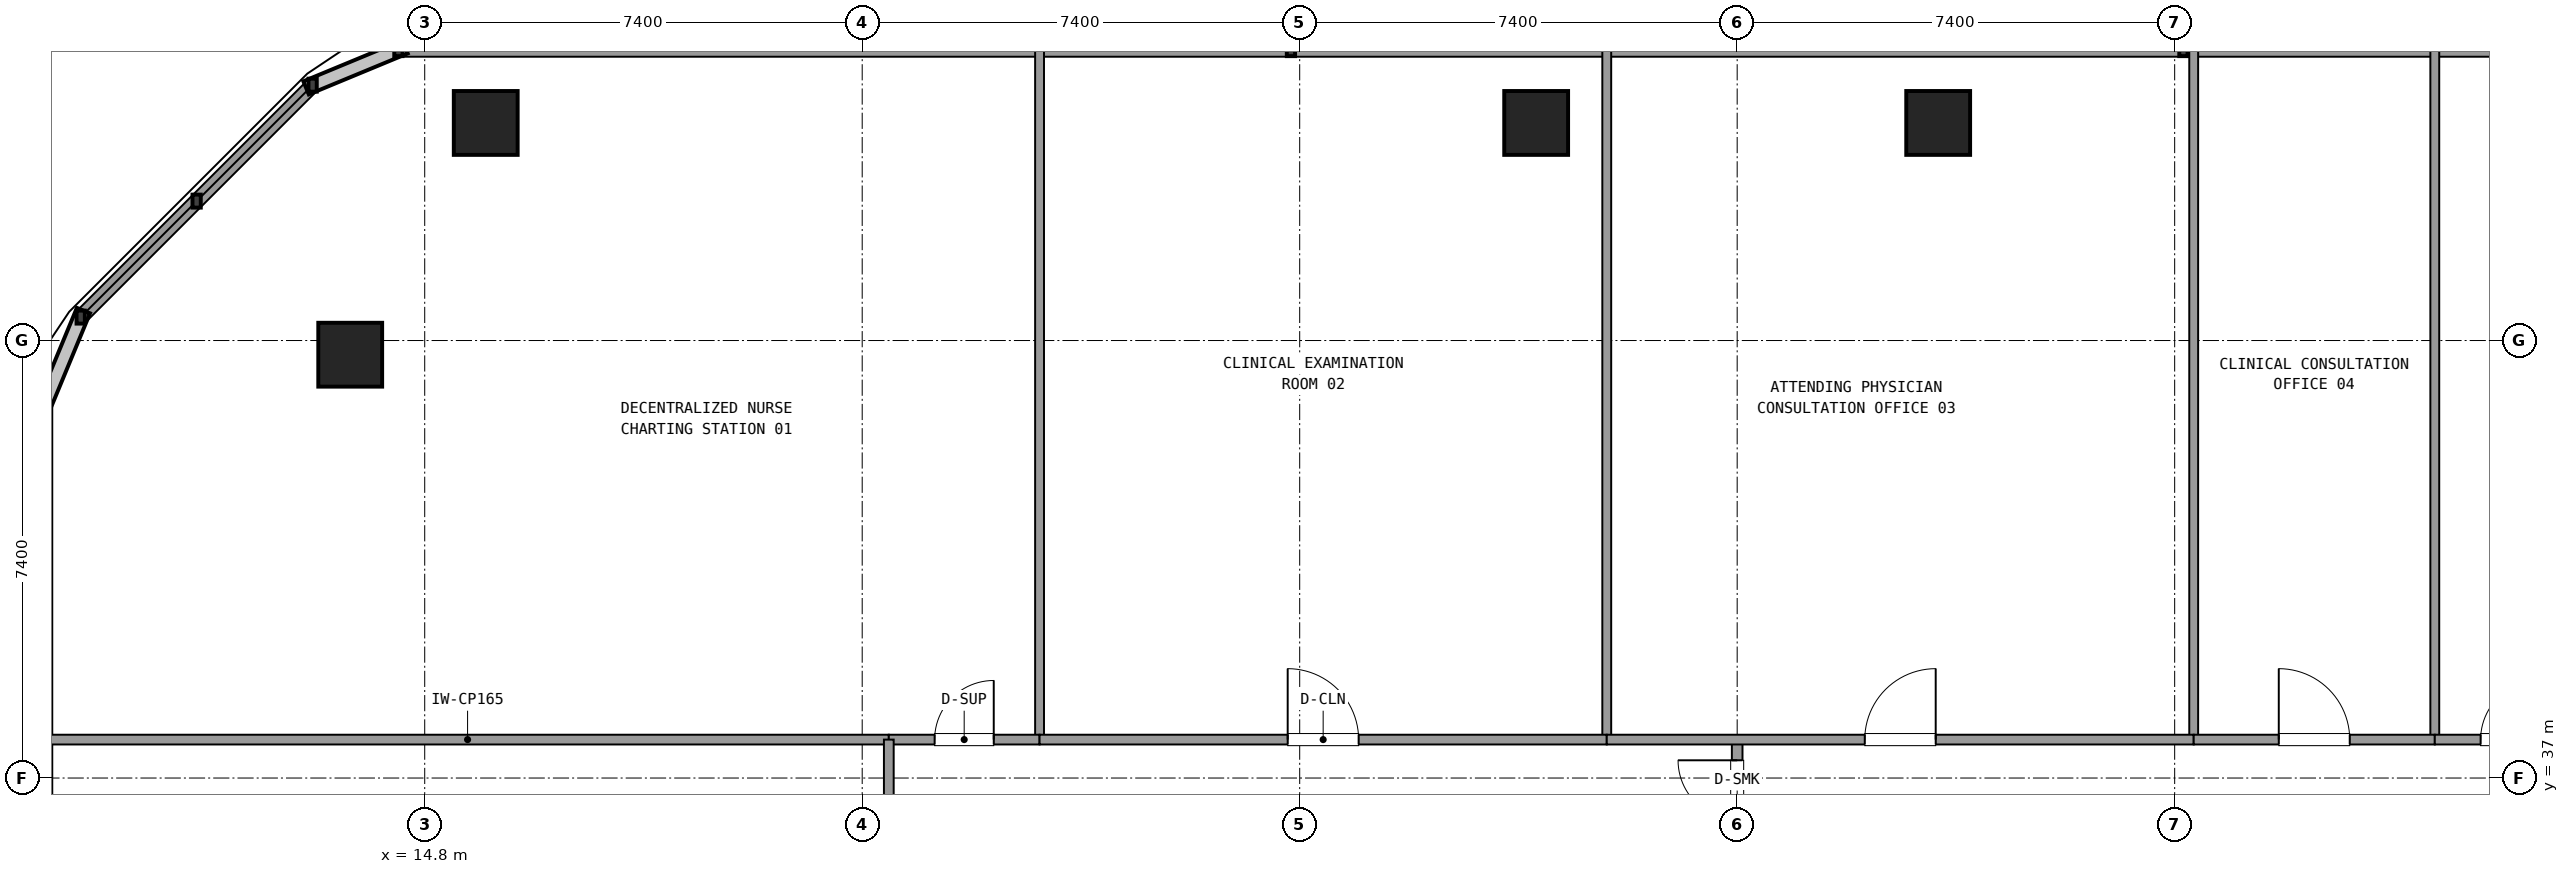
"""IFC4 building model, lengths in metres.
Left out: names, types, materials, properties, quantities, classifications, styles, units other than length and angle.
Written with IfcOpenShell. Run it as: python <this file> out.ifc"""

import sys

from ifc_helpers import new_model, si_unit, direction, frame, frame_2d, origin, origin_2d, place, context, subcontext, project, spatial, rectangle, extrude, element, fill, save


model = new_model("IFC4")
c1 = context("Model", 3, precision=1e-05, world=origin(), true_north=direction((0.0, 1.0)))
c2 = subcontext(c1, "Body", "Model", "MODEL_VIEW")
j1 = project(units=[si_unit("LENGTHUNIT", "METRE"), si_unit("PLANEANGLEUNIT", "RADIAN")], contexts=[c1])
p1 = place(None, origin())
s1 = spatial("IfcSite", under=j1, at=p1, CompositionType="ELEMENT")
p2 = place(p1, origin())
s2 = spatial("IfcBuilding", under=s1, at=p2, CompositionType="ELEMENT")
p3 = place(p2, frame((0.0, 0.0, 27.54)))
s3 = spatial("IfcBuildingStorey", under=s2, at=p3, CompositionType="ELEMENT", Elevation=27.54)
for number, where, z_axis, x_axis in (
    (1, (40.4, 48.08, 0.0), (0.0, 0.0, 1.0), (1.0, 0.0, 0.0)),
    (2, (33.6, 48.08, 0.0), (0.0, 0.0, 1.0), (1.0, 0.0, 0.0)),
    (3, (15.832, 48.08, 0.0), (0.0, 0.0, 1.0), (1.0, 0.0, 0.0)),
    (4, (13.54, 44.16, 0.0), (0.0, 0.0, 1.0), (1.0, 0.0, 0.0)),
):
    element("IfcColumn", number, at=place(p3, frame(where, z_axis=z_axis, x_axis=x_axis)), inside=s3, PredefinedType="COLUMN", context=c2, shape_type="SweptSolid", body=[
        extrude(rectangle(XDim=1.08, YDim=1.08, at=origin_2d()), origin(), (0.0, 0.0, 1.0), 3.6),
    ])
p4 = place(p3, frame((59.645, 49.32, 0.0), z_axis=(0.0, 0.0, 1.0), x_axis=(-1.0, 0.0, 0.0)))
e5 = element("IfcWall", 5, at=p4, inside=s3, PredefinedType="SOLIDWALL", context=c2, shape_type="SweptSolid", body=[
    extrude(rectangle(XDim=45.29, YDim=0.24, at=frame_2d((22.645, 0.0))), origin(), (0.0, 0.0, 1.0), 0.85),
])
p5 = place(p3, frame((12.904, 48.719, 0.0), z_axis=(0.0, 0.0, 1.0), x_axis=(-0.707106781187, -0.707106781187, 0.0)))
e6 = element("IfcWall", 6, at=p5, inside=s3, PredefinedType="SOLIDWALL", context=c2, shape_type="SweptSolid", body=[
    extrude(rectangle(XDim=5.548, YDim=0.24, at=frame_2d((2.774, 0.0))), origin(), (0.0, 0.0, 1.0), 0.85),
])
p6 = place(p3, frame((37.0, 34.95, 0.0), z_axis=(0.0, 0.0, 1.0), x_axis=(0.0, 1.0, 0.0)))
e7 = element("IfcWall", 7, at=p6, inside=s3, PredefinedType="PARTITIONING", context=c2, shape_type="SweptSolid", body=[
    extrude(rectangle(XDim=2.7, YDim=0.18, at=frame_2d((1.35, 0.0))), origin(), (0.0, 0.0, 1.0), 2.61),
])
p7 = place(p6, frame((0.35, 0.0, 0.0)))
e8 = element("IfcOpeningElement", 8, at=p7, cuts=e7, PredefinedType="OPENING", context=c2, shape_type="SweptSolid", body=[
    extrude(rectangle(XDim=2.0, YDim=2.2, at=frame_2d((1.0, 1.1))), frame((0.0, 0.1, 0.0), z_axis=(0.0, -1.0, 0.0), x_axis=(1.0, 0.0, 0.0)), (0.0, 0.0, 1.0), 0.2),
])
p8 = place(p3, frame((8.4, 37.65, 0.0), z_axis=(0.0, 0.0, 1.0), x_axis=(1.0, 0.0, 0.0)))
e9 = element("IfcWall", 9, at=p8, inside=s3, PredefinedType="PARTITIONING", context=c2, shape_type="SweptSolid", body=[
    extrude(rectangle(XDim=14.25, YDim=0.165, at=frame_2d((7.125, 0.0))), origin(), (0.0, 0.0, 1.0), 2.61),
])
p9 = place(p3, frame((25.2, 37.65, 0.0), z_axis=(0.0, 0.0, 1.0), x_axis=(0.0, 1.0, 0.0)))
e10 = element("IfcWall", 10, at=p9, inside=s3, PredefinedType="PARTITIONING", context=c2, shape_type="SweptSolid", body=[
    extrude(rectangle(XDim=11.65, YDim=0.15, at=frame_2d((5.825, 0.0))), origin(), (0.0, 0.0, 1.0), 2.61),
])
p10 = place(p3, frame((22.65, 37.65, 0.0), z_axis=(0.0, 0.0, 1.0), x_axis=(1.0, 0.0, 0.0)))
e11 = element("IfcWall", 11, at=p10, inside=s3, PredefinedType="PARTITIONING", context=c2, shape_type="SweptSolid", body=[
    extrude(rectangle(XDim=2.55, YDim=0.165, at=frame_2d((1.275, 0.0))), origin(), (0.0, 0.0, 1.0), 2.61),
])
p11 = place(p10, frame((0.775, 0.0, 0.0)))
e12 = element("IfcOpeningElement", 12, at=p11, cuts=e11, PredefinedType="OPENING", context=c2, shape_type="SweptSolid", body=[
    extrude(rectangle(XDim=1.0, YDim=2.15, at=frame_2d((0.5, 1.075))), frame((0.0, 0.093, 0.0), z_axis=(0.0, -1.0, 0.0), x_axis=(1.0, 0.0, 0.0)), (0.0, 0.0, 1.0), 0.185),
])
p12 = place(p3, frame((34.794, 37.65, 0.0), z_axis=(0.0, 0.0, 1.0), x_axis=(0.0, 1.0, 0.0)))
e13 = element("IfcWall", 13, at=p12, inside=s3, PredefinedType="PARTITIONING", context=c2, shape_type="SweptSolid", body=[
    extrude(rectangle(XDim=11.65, YDim=0.15, at=frame_2d((5.825, 0.0))), origin(), (0.0, 0.0, 1.0), 2.61),
])
p13 = place(p3, frame((25.2, 37.65, 0.0), z_axis=(0.0, 0.0, 1.0), x_axis=(1.0, 0.0, 0.0)))
e14 = element("IfcWall", 14, at=p13, inside=s3, PredefinedType="PARTITIONING", context=c2, shape_type="SweptSolid", body=[
    extrude(rectangle(XDim=9.594, YDim=0.165, at=frame_2d((4.797, 0.0))), origin(), (0.0, 0.0, 1.0), 2.61),
])
p14 = place(p13, frame((4.197, 0.0, 0.0)))
e15 = element("IfcOpeningElement", 15, at=p14, cuts=e14, PredefinedType="OPENING", context=c2, shape_type="SweptSolid", body=[
    extrude(rectangle(XDim=1.2, YDim=2.15, at=frame_2d((0.6, 1.075))), frame((0.0, 0.093, 0.0), z_axis=(0.0, -1.0, 0.0), x_axis=(1.0, 0.0, 0.0)), (0.0, 0.0, 1.0), 0.185),
])
p15 = place(p3, frame((44.722, 37.65, 0.0), z_axis=(0.0, 0.0, 1.0), x_axis=(0.0, 1.0, 0.0)))
e16 = element("IfcWall", 16, at=p15, inside=s3, PredefinedType="PARTITIONING", context=c2, shape_type="SweptSolid", body=[
    extrude(rectangle(XDim=11.65, YDim=0.15, at=frame_2d((5.825, 0.0))), origin(), (0.0, 0.0, 1.0), 2.61),
])
p16 = place(p3, frame((34.794, 37.65, 0.0), z_axis=(0.0, 0.0, 1.0), x_axis=(1.0, 0.0, 0.0)))
e17 = element("IfcWall", 17, at=p16, inside=s3, PredefinedType="PARTITIONING", context=c2, shape_type="SweptSolid", body=[
    extrude(rectangle(XDim=9.928, YDim=0.165, at=frame_2d((4.964, 0.0))), origin(), (0.0, 0.0, 1.0), 2.61),
])
p17 = place(p16, frame((4.364, 0.0, 0.0)))
e18 = element("IfcOpeningElement", 18, at=p17, cuts=e17, PredefinedType="OPENING", context=c2, shape_type="SweptSolid", body=[
    extrude(rectangle(XDim=1.2, YDim=2.15, at=frame_2d((0.6, 1.075))), frame((0.0, 0.093, 0.0), z_axis=(0.0, -1.0, 0.0), x_axis=(1.0, 0.0, 0.0)), (0.0, 0.0, 1.0), 0.185),
])
p18 = place(p3, frame((48.8, 37.65, 0.0), z_axis=(0.0, 0.0, 1.0), x_axis=(0.0, 1.0, 0.0)))
e19 = element("IfcWall", 19, at=p18, inside=s3, PredefinedType="PARTITIONING", context=c2, shape_type="SweptSolid", body=[
    extrude(rectangle(XDim=11.65, YDim=0.15, at=frame_2d((5.825, 0.0))), origin(), (0.0, 0.0, 1.0), 2.61),
])
p19 = place(p3, frame((44.722, 37.65, 0.0), z_axis=(0.0, 0.0, 1.0), x_axis=(1.0, 0.0, 0.0)))
e20 = element("IfcWall", 20, at=p19, inside=s3, PredefinedType="PARTITIONING", context=c2, shape_type="SweptSolid", body=[
    extrude(rectangle(XDim=4.078, YDim=0.165, at=frame_2d((2.039, 0.0))), origin(), (0.0, 0.0, 1.0), 2.61),
])
p20 = place(p19, frame((1.439, 0.0, 0.0)))
e21 = element("IfcOpeningElement", 21, at=p20, cuts=e20, PredefinedType="OPENING", context=c2, shape_type="SweptSolid", body=[
    extrude(rectangle(XDim=1.2, YDim=2.15, at=frame_2d((0.6, 1.075))), frame((0.0, 0.093, 0.0), z_axis=(0.0, -1.0, 0.0), x_axis=(1.0, 0.0, 0.0)), (0.0, 0.0, 1.0), 0.185),
])
p21 = place(p3, frame((48.8, 37.65, 0.0), z_axis=(0.0, 0.0, 1.0), x_axis=(1.0, 0.0, 0.0)))
e22 = element("IfcWall", 22, at=p21, inside=s3, PredefinedType="PARTITIONING", context=c2, shape_type="SweptSolid", body=[
    extrude(rectangle(XDim=2.55, YDim=0.165, at=frame_2d((1.275, 0.0))), origin(), (0.0, 0.0, 1.0), 2.61),
])
p22 = place(p21, frame((0.775, 0.0, 0.0)))
e23 = element("IfcOpeningElement", 23, at=p22, cuts=e22, PredefinedType="OPENING", context=c2, shape_type="SweptSolid", body=[
    extrude(rectangle(XDim=1.0, YDim=2.15, at=frame_2d((0.5, 1.075))), frame((0.0, 0.093, 0.0), z_axis=(0.0, -1.0, 0.0), x_axis=(1.0, 0.0, 0.0)), (0.0, 0.0, 1.0), 0.185),
])
p23 = place(p3, frame((22.65, 30.13, 0.0), z_axis=(0.0, 0.0, 1.0), x_axis=(0.0, 1.0, 0.0)))
e24 = element("IfcWall", 24, at=p23, inside=s3, PredefinedType="PARTITIONING", context=c2, shape_type="SweptSolid", body=[
    extrude(rectangle(XDim=7.52, YDim=0.165, at=frame_2d((3.76, 0.0))), origin(), (0.0, 0.0, 1.0), 2.61),
])
p24 = place(p23, frame((3.16, 0.0, 0.0)))
e25 = element("IfcOpeningElement", 25, at=p24, cuts=e24, PredefinedType="OPENING", context=c2, shape_type="SweptSolid", body=[
    extrude(rectangle(XDim=1.2, YDim=2.15, at=frame_2d((0.6, 1.075))), frame((0.0, 0.093, 0.0), z_axis=(0.0, -1.0, 0.0), x_axis=(1.0, 0.0, 0.0)), (0.0, 0.0, 1.0), 0.185),
])
p25 = place(p7, origin())
e26 = element("IfcDoor", 26, at=p25, inside=s3, OperationType="DOUBLE_DOOR_SINGLE_SWING", PredefinedType="DOOR", context=c2, shape_type="SweptSolid", body=[
    extrude(rectangle(XDim=2.0, YDim=2.2, at=frame_2d((1.0, 1.1))), frame((0.0, 0.025, 0.0), z_axis=(0.0, -1.0, 0.0), x_axis=(1.0, 0.0, 0.0)), (0.0, 0.0, 1.0), 0.05),
])
fill(e8, e26)
p26 = place(p11, origin())
e27 = element("IfcDoor", 27, at=p26, inside=s3, OperationType="SINGLE_SWING_RIGHT", PredefinedType="DOOR", context=c2, shape_type="SweptSolid", body=[
    extrude(rectangle(XDim=1.0, YDim=2.15, at=frame_2d((0.5, 1.075))), frame((0.0, 0.025, 0.0), z_axis=(0.0, -1.0, 0.0), x_axis=(1.0, 0.0, 0.0)), (0.0, 0.0, 1.0), 0.05),
])
fill(e12, e27)
p27 = place(p14, origin())
e28 = element("IfcDoor", 28, at=p27, inside=s3, OperationType="SINGLE_SWING_LEFT", PredefinedType="DOOR", context=c2, shape_type="SweptSolid", body=[
    extrude(rectangle(XDim=1.2, YDim=2.15, at=frame_2d((0.6, 1.075))), frame((0.0, 0.025, 0.0), z_axis=(0.0, -1.0, 0.0), x_axis=(1.0, 0.0, 0.0)), (0.0, 0.0, 1.0), 0.05),
])
fill(e15, e28)
p28 = place(p17, origin())
e29 = element("IfcDoor", 29, at=p28, inside=s3, OperationType="SINGLE_SWING_RIGHT", PredefinedType="DOOR", context=c2, shape_type="SweptSolid", body=[
    extrude(rectangle(XDim=1.2, YDim=2.15, at=frame_2d((0.6, 1.075))), frame((0.0, 0.025, 0.0), z_axis=(0.0, -1.0, 0.0), x_axis=(1.0, 0.0, 0.0)), (0.0, 0.0, 1.0), 0.05),
])
fill(e18, e29)
p29 = place(p20, origin())
e30 = element("IfcDoor", 30, at=p29, inside=s3, OperationType="SINGLE_SWING_LEFT", PredefinedType="DOOR", context=c2, shape_type="SweptSolid", body=[
    extrude(rectangle(XDim=1.2, YDim=2.15, at=frame_2d((0.6, 1.075))), frame((0.0, 0.025, 0.0), z_axis=(0.0, -1.0, 0.0), x_axis=(1.0, 0.0, 0.0)), (0.0, 0.0, 1.0), 0.05),
])
fill(e21, e30)
p30 = place(p22, origin())
e31 = element("IfcDoor", 31, at=p30, inside=s3, OperationType="SINGLE_SWING_RIGHT", PredefinedType="DOOR", context=c2, shape_type="SweptSolid", body=[
    extrude(rectangle(XDim=1.0, YDim=2.15, at=frame_2d((0.5, 1.075))), frame((0.0, 0.025, 0.0), z_axis=(0.0, -1.0, 0.0), x_axis=(1.0, 0.0, 0.0)), (0.0, 0.0, 1.0), 0.05),
])
fill(e23, e31)
save(model, sys.argv[1])
